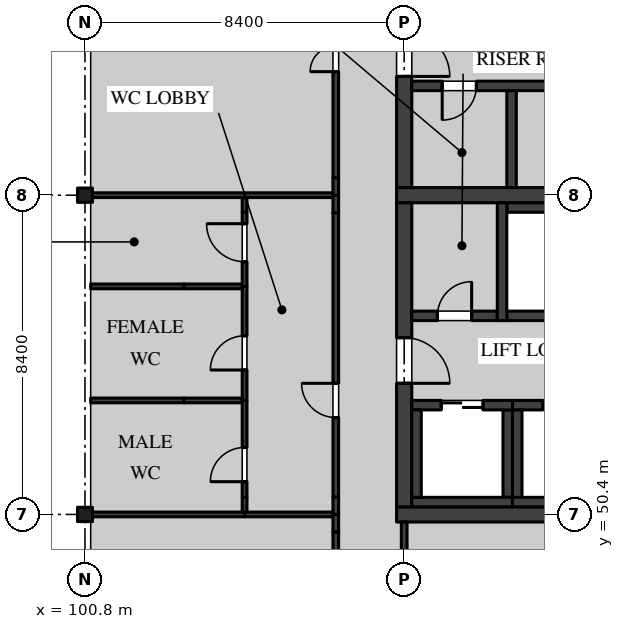
"""IFC4 building model, lengths in metres.
Left out: names, types, materials, properties, quantities, classifications, styles, units other than length and angle.
Written with IfcOpenShell. Run it as: python <this file> out.ifc"""

import sys

from ifc_helpers import new_model, si_unit, direction, frame, frame_2d, origin, origin_2d, place, context, subcontext, project, spatial, rectangle, i_section, extrude, element, fill, save


model = new_model("IFC4")
c1 = context("Model", 3, precision=1e-05, world=origin(), true_north=direction((0.0, 1.0)))
c2 = subcontext(c1, "Body", "Model", "MODEL_VIEW")
j1 = project(units=[si_unit("LENGTHUNIT", "METRE"), si_unit("PLANEANGLEUNIT", "RADIAN")], contexts=[c1])
p1 = place(None, origin())
s1 = spatial("IfcSite", under=j1, at=p1, CompositionType="ELEMENT")
p2 = place(p1, origin())
s2 = spatial("IfcBuilding", under=s1, at=p2, CompositionType="ELEMENT")
p3 = place(p2, frame((0.0, 0.0, 18.9)))
s3 = spatial("IfcBuildingStorey", under=s2, at=p3, CompositionType="ELEMENT", Elevation=18.9)
for number, where, z_axis, x_axis in (
    (1, (100.8, 50.4, 0.0), (0.0, 0.0, 1.0), (1.0, 0.0, 0.0)),
    (2, (100.8, 58.8, 0.0), (0.0, 0.0, 1.0), (1.0, 0.0, 0.0)),
):
    element("IfcColumn", number, at=place(p3, frame(where, z_axis=z_axis, x_axis=x_axis)), inside=s3, PredefinedType="COLUMN", context=c2, shape_type="SweptSolid", body=[
        extrude(i_section(OverallWidth=0.394, OverallDepth=0.376, WebThickness=0.017, FlangeThickness=0.028, FilletRadius=0.015, at=origin_2d()), origin(), (0.0, 0.0, 1.0), 4.37),
    ])
p4 = place(p3, frame((109.0, 50.4, 0.0), z_axis=(0.0, 0.0, 1.0), x_axis=(1.0, 0.0, 0.0)))
e3 = element("IfcWall", 3, at=p4, inside=s3, PredefinedType="SHEAR", context=c2, shape_type="SweptSolid", body=[
    extrude(rectangle(XDim=8.8, YDim=0.4, at=frame_2d((4.4, 0.0))), origin(), (0.0, 0.0, 1.0), 4.37),
])
p5 = place(p3, frame((109.0, 58.8, 0.0), z_axis=(0.0, 0.0, 1.0), x_axis=(1.0, 0.0, 0.0)))
e4 = element("IfcWall", 4, at=p5, inside=s3, PredefinedType="SHEAR", context=c2, shape_type="SweptSolid", body=[
    extrude(rectangle(XDim=8.8, YDim=0.4, at=frame_2d((4.4, 0.0))), origin(), (0.0, 0.0, 1.0), 4.37),
])
p6 = place(p5, frame((6.65, 0.0, 0.0)))
e5 = element("IfcOpeningElement", 5, at=p6, cuts=e4, PredefinedType="OPENING", context=c2, shape_type="SweptSolid", body=[
    extrude(rectangle(XDim=1.1, YDim=2.1, at=frame_2d((0.55, 1.05))), frame((0.0, 0.21, 0.0), z_axis=(0.0, -1.0, 0.0), x_axis=(1.0, 0.0, 0.0)), (0.0, 0.0, 1.0), 0.42),
])
p7 = place(p3, frame((109.2, 50.6, 0.0), z_axis=(0.0, 0.0, 1.0), x_axis=(0.0, 1.0, 0.0)))
e6 = element("IfcWall", 6, at=p7, inside=s3, PredefinedType="SHEAR", context=c2, shape_type="SweptSolid", body=[
    extrude(rectangle(XDim=8.0, YDim=0.4, at=frame_2d((4.0, 0.0))), origin(), (0.0, 0.0, 1.0), 4.37),
])
p8 = place(p7, frame((3.25, 0.0, 0.0)))
e7 = element("IfcOpeningElement", 7, at=p8, cuts=e6, PredefinedType="OPENING", context=c2, shape_type="SweptSolid", body=[
    extrude(rectangle(XDim=1.2, YDim=2.1, at=frame_2d((0.6, 1.05))), frame((0.0, 0.21, 0.0), z_axis=(0.0, -1.0, 0.0), x_axis=(1.0, 0.0, 0.0)), (0.0, 0.0, 1.0), 0.42),
])
p9 = place(p3, frame((109.4, 55.625, 0.0), z_axis=(0.0, 0.0, 1.0), x_axis=(1.0, 0.0, 0.0)))
e8 = element("IfcWall", 8, at=p9, inside=s3, PredefinedType="SOLIDWALL", context=c2, shape_type="SweptSolid", body=[
    extrude(rectangle(XDim=2.25, YDim=0.25, at=frame_2d((1.125, 0.0))), origin(), (0.0, 0.0, 1.0), 4.37),
])
p10 = place(p9, frame((0.675, 0.0, 0.0)))
e9 = element("IfcOpeningElement", 9, at=p10, cuts=e8, PredefinedType="OPENING", context=c2, shape_type="SweptSolid", body=[
    extrude(rectangle(XDim=0.9, YDim=2.1, at=frame_2d((0.45, 1.05))), frame((0.0, 0.135, 0.0), z_axis=(0.0, -1.0, 0.0), x_axis=(1.0, 0.0, 0.0)), (0.0, 0.0, 1.0), 0.27),
])
p11 = place(p3, frame((109.2, 59.0, 0.0), z_axis=(0.0, 0.0, 1.0), x_axis=(0.0, 1.0, 0.0)))
e10 = element("IfcWall", 10, at=p11, inside=s3, PredefinedType="SHEAR", context=c2, shape_type="SweptSolid", body=[
    extrude(rectangle(XDim=8.0, YDim=0.4, at=frame_2d((4.0, 0.0))), origin(), (0.0, 0.0, 1.0), 4.37),
])
p12 = place(p11, frame((2.925, 0.0, 0.0)))
e11 = element("IfcOpeningElement", 11, at=p12, cuts=e10, PredefinedType="OPENING", context=c2, shape_type="SweptSolid", body=[
    extrude(rectangle(XDim=1.2, YDim=2.1, at=frame_2d((0.6, 1.05))), frame((0.0, 0.21, 0.0), z_axis=(0.0, -1.0, 0.0), x_axis=(1.0, 0.0, 0.0)), (0.0, 0.0, 1.0), 0.42),
])
p13 = place(p3, frame((114.75, 61.675, 0.0), z_axis=(0.0, 0.0, 1.0), x_axis=(-1.0, 0.0, 0.0)))
e12 = element("IfcWall", 12, at=p13, inside=s3, PredefinedType="SOLIDWALL", context=c2, shape_type="SweptSolid", body=[
    extrude(rectangle(XDim=5.35, YDim=0.25, at=frame_2d((2.675, 0.0))), origin(), (0.0, 0.0, 1.0), 4.37),
])
p14 = place(p13, frame((3.65, 0.0, 0.0)))
e13 = element("IfcOpeningElement", 13, at=p14, cuts=e12, PredefinedType="OPENING", context=c2, shape_type="SweptSolid", body=[
    extrude(rectangle(XDim=0.9, YDim=2.1, at=frame_2d((0.45, 1.05))), frame((0.0, 0.135, 0.0), z_axis=(0.0, -1.0, 0.0), x_axis=(1.0, 0.0, 0.0)), (0.0, 0.0, 1.0), 0.27),
])
p15 = place(p13, frame((0.9, 0.0, 0.0)))
e14 = element("IfcOpeningElement", 14, at=p15, cuts=e12, PredefinedType="OPENING", context=c2, shape_type="SweptSolid", body=[
    extrude(rectangle(XDim=0.8, YDim=2.1, at=frame_2d((0.4, 1.05))), frame((0.0, 0.135, 0.0), z_axis=(0.0, -1.0, 0.0), x_axis=(1.0, 0.0, 0.0)), (0.0, 0.0, 1.0), 0.27),
])
p16 = place(p3, frame((112.025, 61.55, 0.0), z_axis=(0.0, 0.0, 1.0), x_axis=(0.0, -1.0, 0.0)))
e15 = element("IfcWall", 15, at=p16, inside=s3, PredefinedType="SOLIDWALL", context=c2, shape_type="SweptSolid", body=[
    extrude(rectangle(XDim=2.55, YDim=0.25, at=frame_2d((1.275, 0.0))), origin(), (0.0, 0.0, 1.0), 4.37),
])
for number, where, z_axis, x_axis in (
    (16, (111.9, 58.475, 0.0), (0.0, 0.0, 1.0), (1.0, 0.0, 0.0)),
    (17, (111.9, 55.625, 0.0), (0.0, 0.0, 1.0), (1.0, 0.0, 0.0)),
):
    element("IfcWall", number, at=place(p3, frame(where, z_axis=z_axis, x_axis=x_axis)), inside=s3, PredefinedType="SOLIDWALL", context=c2, shape_type="SweptSolid", body=[
        extrude(rectangle(XDim=2.6, YDim=0.25, at=frame_2d((1.3, 0.0))), origin(), (0.0, 0.0, 1.0), 4.37),
    ])
p17 = place(p3, frame((111.775, 55.5, 0.0), z_axis=(0.0, 0.0, 1.0), x_axis=(0.0, 1.0, 0.0)))
e18 = element("IfcWall", 18, at=p17, inside=s3, PredefinedType="SOLIDWALL", context=c2, shape_type="SweptSolid", body=[
    extrude(rectangle(XDim=3.1, YDim=0.25, at=frame_2d((1.55, 0.0))), origin(), (0.0, 0.0, 1.0), 4.37),
])
p18 = place(p3, frame((111.925, 50.85, 0.0), z_axis=(0.0, 0.0, 1.0), x_axis=(0.0, 1.0, 0.0)))
e19 = element("IfcWall", 19, at=p18, inside=s3, PredefinedType="SOLIDWALL", context=c2, shape_type="SweptSolid", body=[
    extrude(rectangle(XDim=2.3, YDim=0.25, at=frame_2d((1.15, 0.0))), origin(), (0.0, 0.0, 1.0), 4.37),
])
p19 = place(p3, frame((109.4, 53.275, 0.0), z_axis=(0.0, 0.0, 1.0), x_axis=(1.0, 0.0, 0.0)))
e20 = element("IfcWall", 20, at=p19, inside=s3, PredefinedType="SOLIDWALL", context=c2, shape_type="SweptSolid", body=[
    extrude(rectangle(XDim=2.65, YDim=0.25, at=frame_2d((1.325, 0.0))), origin(), (0.0, 0.0, 1.0), 4.37),
])
p20 = place(p19, frame((0.775, 0.0, 0.0)))
e21 = element("IfcOpeningElement", 21, at=p20, cuts=e20, PredefinedType="OPENING", context=c2, shape_type="SweptSolid", body=[
    extrude(rectangle(XDim=1.1, YDim=2.1, at=frame_2d((0.55, 1.05))), frame((0.0, 0.135, 0.0), z_axis=(0.0, -1.0, 0.0), x_axis=(1.0, 0.0, 0.0)), (0.0, 0.0, 1.0), 0.27),
])
p21 = place(p3, frame((109.4, 50.725, 0.0), z_axis=(0.0, 0.0, 1.0), x_axis=(1.0, 0.0, 0.0)))
e22 = element("IfcWall", 22, at=p21, inside=s3, PredefinedType="SOLIDWALL", context=c2, shape_type="SweptSolid", body=[
    extrude(rectangle(XDim=2.65, YDim=0.25, at=frame_2d((1.325, 0.0))), origin(), (0.0, 0.0, 1.0), 4.37),
])
p22 = place(p3, frame((109.525, 50.85, 0.0), z_axis=(0.0, 0.0, 1.0), x_axis=(0.0, 1.0, 0.0)))
e23 = element("IfcWall", 23, at=p22, inside=s3, PredefinedType="SOLIDWALL", context=c2, shape_type="SweptSolid", body=[
    extrude(rectangle(XDim=2.3, YDim=0.25, at=frame_2d((1.15, 0.0))), origin(), (0.0, 0.0, 1.0), 4.37),
])
p23 = place(p3, frame((112.05, 53.275, 0.0), z_axis=(0.0, 0.0, 1.0), x_axis=(1.0, 0.0, 0.0)))
e24 = element("IfcWall", 24, at=p23, inside=s3, PredefinedType="SOLIDWALL", context=c2, shape_type="SweptSolid", body=[
    extrude(rectangle(XDim=2.7, YDim=0.25, at=frame_2d((1.35, 0.0))), origin(), (0.0, 0.0, 1.0), 4.37),
])
p24 = place(p23, frame((0.8, 0.0, 0.0)))
e25 = element("IfcOpeningElement", 25, at=p24, cuts=e24, PredefinedType="OPENING", context=c2, shape_type="SweptSolid", body=[
    extrude(rectangle(XDim=1.1, YDim=2.1, at=frame_2d((0.55, 1.05))), frame((0.0, 0.135, 0.0), z_axis=(0.0, -1.0, 0.0), x_axis=(1.0, 0.0, 0.0)), (0.0, 0.0, 1.0), 0.27),
])
p25 = place(p3, frame((112.05, 50.725, 0.0), z_axis=(0.0, 0.0, 1.0), x_axis=(1.0, 0.0, 0.0)))
e26 = element("IfcWall", 26, at=p25, inside=s3, PredefinedType="SOLIDWALL", context=c2, shape_type="SweptSolid", body=[
    extrude(rectangle(XDim=2.7, YDim=0.25, at=frame_2d((1.35, 0.0))), origin(), (0.0, 0.0, 1.0), 4.37),
])
p26 = place(p3, frame((112.175, 50.85, 0.0), z_axis=(0.0, 0.0, 1.0), x_axis=(0.0, 1.0, 0.0)))
e27 = element("IfcWall", 27, at=p26, inside=s3, PredefinedType="SOLIDWALL", context=c2, shape_type="SweptSolid", body=[
    extrude(rectangle(XDim=2.3, YDim=0.25, at=frame_2d((1.15, 0.0))), origin(), (0.0, 0.0, 1.0), 4.37),
])
p27 = place(p3, frame((109.2, 42.2, 0.0), z_axis=(0.0, 0.0, 1.0), x_axis=(0.0, 1.0, 0.0)))
e28 = element("IfcWall", 28, at=p27, inside=s3, PredefinedType="PARTITIONING", context=c2, shape_type="SweptSolid", body=[
    extrude(rectangle(XDim=8.0, YDim=0.15, at=frame_2d((4.0, 0.0))), origin(), (0.0, 0.0, 1.0), 3.746),
])
p28 = place(p27, frame((3.55, 0.0, 0.0)))
e29 = element("IfcOpeningElement", 29, at=p28, cuts=e28, PredefinedType="OPENING", context=c2, shape_type="SweptSolid", body=[
    extrude(rectangle(XDim=0.9, YDim=2.1, at=frame_2d((0.45, 1.05))), frame((0.0, 0.085, 0.0), z_axis=(0.0, -1.0, 0.0), x_axis=(1.0, 0.0, 0.0)), (0.0, 0.0, 1.0), 0.17),
])
p29 = place(p3, frame((107.4, 42.23, 0.0), z_axis=(0.0, 0.0, 1.0), x_axis=(0.0, 1.0, 0.0)))
e30 = element("IfcWall", 30, at=p29, inside=s3, PredefinedType="PARTITIONING", context=c2, shape_type="SweptSolid", body=[
    extrude(rectangle(XDim=7.71, YDim=0.15, at=frame_2d((3.855, 0.0))), origin(), (0.0, 0.0, 1.0), 4.37),
])
p30 = place(p3, frame((107.4, 49.94, 0.0), z_axis=(0.0, 0.0, 1.0), x_axis=(0.0, 1.0, 0.0)))
e31 = element("IfcWall", 31, at=p30, inside=s3, PredefinedType="PARTITIONING", context=c2, shape_type="SweptSolid", body=[
    extrude(rectangle(XDim=0.46, YDim=0.15, at=frame_2d((0.23, 0.0))), origin(), (0.0, 0.0, 1.0), 3.746),
])
p31 = place(p3, frame((107.4, 50.4, 0.0), z_axis=(0.0, 0.0, 1.0), x_axis=(0.0, 1.0, 0.0)))
e32 = element("IfcWall", 32, at=p31, inside=s3, PredefinedType="PARTITIONING", context=c2, shape_type="SweptSolid", body=[
    extrude(rectangle(XDim=0.46, YDim=0.15, at=frame_2d((0.23, 0.0))), origin(), (0.0, 0.0, 1.0), 3.746),
])
p32 = place(p3, frame((107.4, 50.86, 0.0), z_axis=(0.0, 0.0, 1.0), x_axis=(0.0, 1.0, 0.0)))
e33 = element("IfcWall", 33, at=p32, inside=s3, PredefinedType="PARTITIONING", context=c2, shape_type="SweptSolid", body=[
    extrude(rectangle(XDim=7.48, YDim=0.15, at=frame_2d((3.74, 0.0))), origin(), (0.0, 0.0, 1.0), 4.37),
])
p33 = place(p32, frame((2.09, 0.0, 0.0)))
e34 = element("IfcOpeningElement", 34, at=p33, cuts=e33, PredefinedType="OPENING", context=c2, shape_type="SweptSolid", body=[
    extrude(rectangle(XDim=0.9, YDim=2.1, at=frame_2d((0.45, 1.05))), frame((0.0, 0.085, 0.0), z_axis=(0.0, -1.0, 0.0), x_axis=(1.0, 0.0, 0.0)), (0.0, 0.0, 1.0), 0.17),
])
for number, where, z_axis, x_axis in (
    (35, (107.4, 58.34, 0.0), (0.0, 0.0, 1.0), (0.0, 1.0, 0.0)),
    (36, (107.4, 58.8, 0.0), (0.0, 0.0, 1.0), (0.0, 1.0, 0.0)),
):
    element("IfcWall", number, at=place(p3, frame(where, z_axis=z_axis, x_axis=x_axis)), inside=s3, PredefinedType="PARTITIONING", context=c2, shape_type="SweptSolid", body=[
        extrude(rectangle(XDim=0.46, YDim=0.15, at=frame_2d((0.23, 0.0))), origin(), (0.0, 0.0, 1.0), 3.746),
    ])
p34 = place(p3, frame((107.4, 59.26, 0.0), z_axis=(0.0, 0.0, 1.0), x_axis=(0.0, 1.0, 0.0)))
e37 = element("IfcWall", 37, at=p34, inside=s3, PredefinedType="PARTITIONING", context=c2, shape_type="SweptSolid", body=[
    extrude(rectangle(XDim=7.79, YDim=0.15, at=frame_2d((3.895, 0.0))), origin(), (0.0, 0.0, 1.0), 4.37),
])
p35 = place(p34, frame((2.79, 0.0, 0.0)))
e38 = element("IfcOpeningElement", 38, at=p35, cuts=e37, PredefinedType="OPENING", context=c2, shape_type="SweptSolid", body=[
    extrude(rectangle(XDim=1.35, YDim=2.1, at=frame_2d((0.675, 1.05))), frame((0.0, 0.085, 0.0), z_axis=(0.0, -1.0, 0.0), x_axis=(1.0, 0.0, 0.0)), (0.0, 0.0, 1.0), 0.17),
])
p36 = place(p3, frame((105.0, 50.4, 0.0), z_axis=(0.0, 0.0, 1.0), x_axis=(1.0, 0.0, 0.0)))
e39 = element("IfcWall", 39, at=p36, inside=s3, PredefinedType="PARTITIONING", context=c2, shape_type="SweptSolid", body=[
    extrude(rectangle(XDim=2.325, YDim=0.125, at=frame_2d((1.163, 0.0))), origin(), (0.0, 0.0, 1.0), 3.746),
])
p37 = place(p3, frame((100.997, 50.4, 0.0), z_axis=(0.0, 0.0, 1.0), x_axis=(1.0, 0.0, 0.0)))
e40 = element("IfcWall", 40, at=p37, inside=s3, PredefinedType="PARTITIONING", context=c2, shape_type="SweptSolid", body=[
    extrude(rectangle(XDim=4.003, YDim=0.125, at=frame_2d((2.001, 0.0))), origin(), (0.0, 0.0, 1.0), 3.746),
])
p38 = place(p3, frame((100.95, 56.4, 0.0), z_axis=(0.0, 0.0, 1.0), x_axis=(1.0, 0.0, 0.0)))
e41 = element("IfcWall", 41, at=p38, inside=s3, PredefinedType="PARTITIONING", context=c2, shape_type="SweptSolid", body=[
    extrude(rectangle(XDim=2.457, YDim=0.125, at=frame_2d((1.229, 0.0))), origin(), (0.0, 0.0, 1.0), 4.37),
])
p39 = place(p3, frame((103.407, 56.4, 0.0), z_axis=(0.0, 0.0, 1.0), x_axis=(1.0, 0.0, 0.0)))
e42 = element("IfcWall", 42, at=p39, inside=s3, PredefinedType="PARTITIONING", context=c2, shape_type="SweptSolid", body=[
    extrude(rectangle(XDim=1.531, YDim=0.125, at=frame_2d((0.766, 0.0))), origin(), (0.0, 0.0, 1.0), 3.895),
])
p40 = place(p3, frame((105.0, 56.4, 0.0), z_axis=(0.0, 0.0, 1.0), x_axis=(0.0, 1.0, 0.0)))
e43 = element("IfcWall", 43, at=p40, inside=s3, PredefinedType="PARTITIONING", context=c2, shape_type="SweptSolid", body=[
    extrude(rectangle(XDim=1.952, YDim=0.125, at=frame_2d((0.976, 0.0))), origin(), (0.0, 0.0, 1.0), 4.37),
])
p41 = place(p40, frame((0.65, 0.0, 0.0)))
e44 = element("IfcOpeningElement", 44, at=p41, cuts=e43, PredefinedType="OPENING", context=c2, shape_type="SweptSolid", body=[
    extrude(rectangle(XDim=1.0, YDim=2.1, at=frame_2d((0.5, 1.05))), frame((0.0, 0.073, 0.0), z_axis=(0.0, -1.0, 0.0), x_axis=(1.0, 0.0, 0.0)), (0.0, 0.0, 1.0), 0.145),
])
p42 = place(p3, frame((105.0, 58.352, 0.0), z_axis=(0.0, 0.0, 1.0), x_axis=(0.0, 1.0, 0.0)))
e45 = element("IfcWall", 45, at=p42, inside=s3, PredefinedType="PARTITIONING", context=c2, shape_type="SweptSolid", body=[
    extrude(rectangle(XDim=0.385, YDim=0.125, at=frame_2d((0.192, 0.0))), origin(), (0.0, 0.0, 1.0), 3.746),
])
p43 = place(p3, frame((100.997, 58.8, 0.0), z_axis=(0.0, 0.0, 1.0), x_axis=(1.0, 0.0, 0.0)))
e46 = element("IfcWall", 46, at=p43, inside=s3, PredefinedType="PARTITIONING", context=c2, shape_type="SweptSolid", body=[
    extrude(rectangle(XDim=4.003, YDim=0.125, at=frame_2d((2.001, 0.0))), origin(), (0.0, 0.0, 1.0), 3.746),
])
p44 = place(p3, frame((105.0, 53.4, 0.0), z_axis=(0.0, 0.0, 1.0), x_axis=(0.0, 1.0, 0.0)))
e47 = element("IfcWall", 47, at=p44, inside=s3, PredefinedType="PARTITIONING", context=c2, shape_type="SweptSolid", body=[
    extrude(rectangle(XDim=3.0, YDim=0.125, at=frame_2d((1.5, 0.0))), origin(), (0.0, 0.0, 1.0), 4.37),
])
p45 = place(p44, frame((0.8, 0.0, 0.0)))
e48 = element("IfcOpeningElement", 48, at=p45, cuts=e47, PredefinedType="OPENING", context=c2, shape_type="SweptSolid", body=[
    extrude(rectangle(XDim=0.9, YDim=2.1, at=frame_2d((0.45, 1.05))), frame((0.0, 0.073, 0.0), z_axis=(0.0, -1.0, 0.0), x_axis=(1.0, 0.0, 0.0)), (0.0, 0.0, 1.0), 0.145),
])
p46 = place(p3, frame((100.95, 53.4, 0.0), z_axis=(0.0, 0.0, 1.0), x_axis=(1.0, 0.0, 0.0)))
e49 = element("IfcWall", 49, at=p46, inside=s3, PredefinedType="PARTITIONING", context=c2, shape_type="SweptSolid", body=[
    extrude(rectangle(XDim=2.457, YDim=0.125, at=frame_2d((1.229, 0.0))), origin(), (0.0, 0.0, 1.0), 4.37),
])
p47 = place(p3, frame((103.407, 53.4, 0.0), z_axis=(0.0, 0.0, 1.0), x_axis=(1.0, 0.0, 0.0)))
e50 = element("IfcWall", 50, at=p47, inside=s3, PredefinedType="PARTITIONING", context=c2, shape_type="SweptSolid", body=[
    extrude(rectangle(XDim=1.531, YDim=0.125, at=frame_2d((0.766, 0.0))), origin(), (0.0, 0.0, 1.0), 3.895),
])
p48 = place(p3, frame((105.0, 50.462, 0.0), z_axis=(0.0, 0.0, 1.0), x_axis=(0.0, 1.0, 0.0)))
e51 = element("IfcWall", 51, at=p48, inside=s3, PredefinedType="PARTITIONING", context=c2, shape_type="SweptSolid", body=[
    extrude(rectangle(XDim=0.385, YDim=0.125, at=frame_2d((0.192, 0.0))), origin(), (0.0, 0.0, 1.0), 3.746),
])
p49 = place(p3, frame((105.0, 50.847, 0.0), z_axis=(0.0, 0.0, 1.0), x_axis=(0.0, 1.0, 0.0)))
e52 = element("IfcWall", 52, at=p49, inside=s3, PredefinedType="PARTITIONING", context=c2, shape_type="SweptSolid", body=[
    extrude(rectangle(XDim=2.553, YDim=0.125, at=frame_2d((1.276, 0.0))), origin(), (0.0, 0.0, 1.0), 4.37),
])
p50 = place(p49, frame((0.415, 0.0, 0.0)))
e53 = element("IfcOpeningElement", 53, at=p50, cuts=e52, PredefinedType="OPENING", context=c2, shape_type="SweptSolid", body=[
    extrude(rectangle(XDim=0.9, YDim=2.1, at=frame_2d((0.45, 1.05))), frame((0.0, 0.073, 0.0), z_axis=(0.0, -1.0, 0.0), x_axis=(1.0, 0.0, 0.0)), (0.0, 0.0, 1.0), 0.145),
])
p51 = place(p3, frame((105.0, 58.8, 0.0), z_axis=(0.0, 0.0, 1.0), x_axis=(1.0, 0.0, 0.0)))
e54 = element("IfcWall", 54, at=p51, inside=s3, PredefinedType="PARTITIONING", context=c2, shape_type="SweptSolid", body=[
    extrude(rectangle(XDim=2.325, YDim=0.125, at=frame_2d((1.163, 0.0))), origin(), (0.0, 0.0, 1.0), 3.746),
])
p52 = place(p8, frame((1.2, 0.0, 0.0), z_axis=(0.0, 0.0, 1.0), x_axis=(-1.0, 0.0, 0.0)))
e55 = element("IfcDoor", 55, at=p52, inside=s3, OperationType="SINGLE_SWING_LEFT", PredefinedType="DOOR", context=c2, shape_type="SweptSolid", body=[
    extrude(rectangle(XDim=1.2, YDim=2.1, at=frame_2d((0.6, 1.05))), frame((0.0, 0.035, 0.0), z_axis=(0.0, -1.0, 0.0), x_axis=(1.0, 0.0, 0.0)), (0.0, 0.0, 1.0), 0.07),
])
fill(e7, e55)
p53 = place(p10, origin())
e56 = element("IfcDoor", 56, at=p53, inside=s3, OperationType="SINGLE_SWING_LEFT", PredefinedType="DOOR", context=c2, shape_type="SweptSolid", body=[
    extrude(rectangle(XDim=0.9, YDim=2.1, at=frame_2d((0.45, 1.05))), frame((0.0, 0.05, 0.0), z_axis=(0.0, -1.0, 0.0), x_axis=(1.0, 0.0, 0.0)), (0.0, 0.0, 1.0), 0.1),
])
fill(e9, e56)
p54 = place(p14, origin())
e57 = element("IfcDoor", 57, at=p54, inside=s3, OperationType="SINGLE_SWING_LEFT", PredefinedType="DOOR", context=c2, shape_type="SweptSolid", body=[
    extrude(rectangle(XDim=0.9, YDim=2.1, at=frame_2d((0.45, 1.05))), frame((0.0, 0.035, 0.0), z_axis=(0.0, -1.0, 0.0), x_axis=(1.0, 0.0, 0.0)), (0.0, 0.0, 1.0), 0.07),
])
fill(e13, e57)
p55 = place(p12, frame((1.2, 0.0, 0.0), z_axis=(0.0, 0.0, 1.0), x_axis=(-1.0, 0.0, 0.0)))
e58 = element("IfcDoor", 58, at=p55, inside=s3, OperationType="SINGLE_SWING_LEFT", PredefinedType="DOOR", context=c2, shape_type="SweptSolid", body=[
    extrude(rectangle(XDim=1.2, YDim=2.1, at=frame_2d((0.6, 1.05))), frame((0.0, 0.035, 0.0), z_axis=(0.0, -1.0, 0.0), x_axis=(1.0, 0.0, 0.0)), (0.0, 0.0, 1.0), 0.07),
])
fill(e11, e58)
p56 = place(p20, origin())
e59 = element("IfcDoor", 59, at=p56, inside=s3, OperationType="DOUBLE_DOOR_SLIDING", PredefinedType="DOOR", context=c2, shape_type="SweptSolid", body=[
    extrude(rectangle(XDim=1.1, YDim=2.1, at=frame_2d((0.55, 1.05))), frame((0.0, 0.04, 0.0), z_axis=(0.0, -1.0, 0.0), x_axis=(1.0, 0.0, 0.0)), (0.0, 0.0, 1.0), 0.08),
])
fill(e21, e59)
p57 = place(p24, origin())
e60 = element("IfcDoor", 60, at=p57, inside=s3, OperationType="DOUBLE_DOOR_SLIDING", PredefinedType="DOOR", context=c2, shape_type="SweptSolid", body=[
    extrude(rectangle(XDim=1.1, YDim=2.1, at=frame_2d((0.55, 1.05))), frame((0.0, 0.04, 0.0), z_axis=(0.0, -1.0, 0.0), x_axis=(1.0, 0.0, 0.0)), (0.0, 0.0, 1.0), 0.08),
])
fill(e25, e60)
p58 = place(p41, origin())
e61 = element("IfcDoor", 61, at=p58, inside=s3, OperationType="SINGLE_SWING_LEFT", PredefinedType="DOOR", context=c2, shape_type="SweptSolid", body=[
    extrude(rectangle(XDim=1.0, YDim=2.1, at=frame_2d((0.5, 1.05))), frame((0.0, 0.02, 0.0), z_axis=(0.0, -1.0, 0.0), x_axis=(1.0, 0.0, 0.0)), (0.0, 0.0, 1.0), 0.04),
])
fill(e44, e61)
p59 = place(p45, origin())
e62 = element("IfcDoor", 62, at=p59, inside=s3, OperationType="SINGLE_SWING_RIGHT", PredefinedType="DOOR", context=c2, shape_type="SweptSolid", body=[
    extrude(rectangle(XDim=0.9, YDim=2.1, at=frame_2d((0.45, 1.05))), frame((0.0, 0.02, 0.0), z_axis=(0.0, -1.0, 0.0), x_axis=(1.0, 0.0, 0.0)), (0.0, 0.0, 1.0), 0.04),
])
fill(e48, e62)
p60 = place(p33, origin())
e63 = element("IfcDoor", 63, at=p60, inside=s3, OperationType="SINGLE_SWING_LEFT", PredefinedType="DOOR", context=c2, shape_type="SweptSolid", body=[
    extrude(rectangle(XDim=0.9, YDim=2.1, at=frame_2d((0.45, 1.05))), frame((0.0, 0.025, 0.0), z_axis=(0.0, -1.0, 0.0), x_axis=(1.0, 0.0, 0.0)), (0.0, 0.0, 1.0), 0.05),
])
fill(e34, e63)
p61 = place(p50, origin())
e64 = element("IfcDoor", 64, at=p61, inside=s3, OperationType="SINGLE_SWING_RIGHT", PredefinedType="DOOR", context=c2, shape_type="SweptSolid", body=[
    extrude(rectangle(XDim=0.9, YDim=2.1, at=frame_2d((0.45, 1.05))), frame((0.0, 0.02, 0.0), z_axis=(0.0, -1.0, 0.0), x_axis=(1.0, 0.0, 0.0)), (0.0, 0.0, 1.0), 0.04),
])
fill(e53, e64)
p62 = place(p35, origin())
e65 = element("IfcDoor", 65, at=p62, inside=s3, OperationType="DOUBLE_DOOR_SINGLE_SWING", PredefinedType="DOOR", context=c2, shape_type="SweptSolid", body=[
    extrude(rectangle(XDim=1.35, YDim=2.1, at=frame_2d((0.675, 1.05))), frame((0.0, 0.025, 0.0), z_axis=(0.0, -1.0, 0.0), x_axis=(1.0, 0.0, 0.0)), (0.0, 0.0, 1.0), 0.05),
])
fill(e38, e65)
save(model, sys.argv[1])
